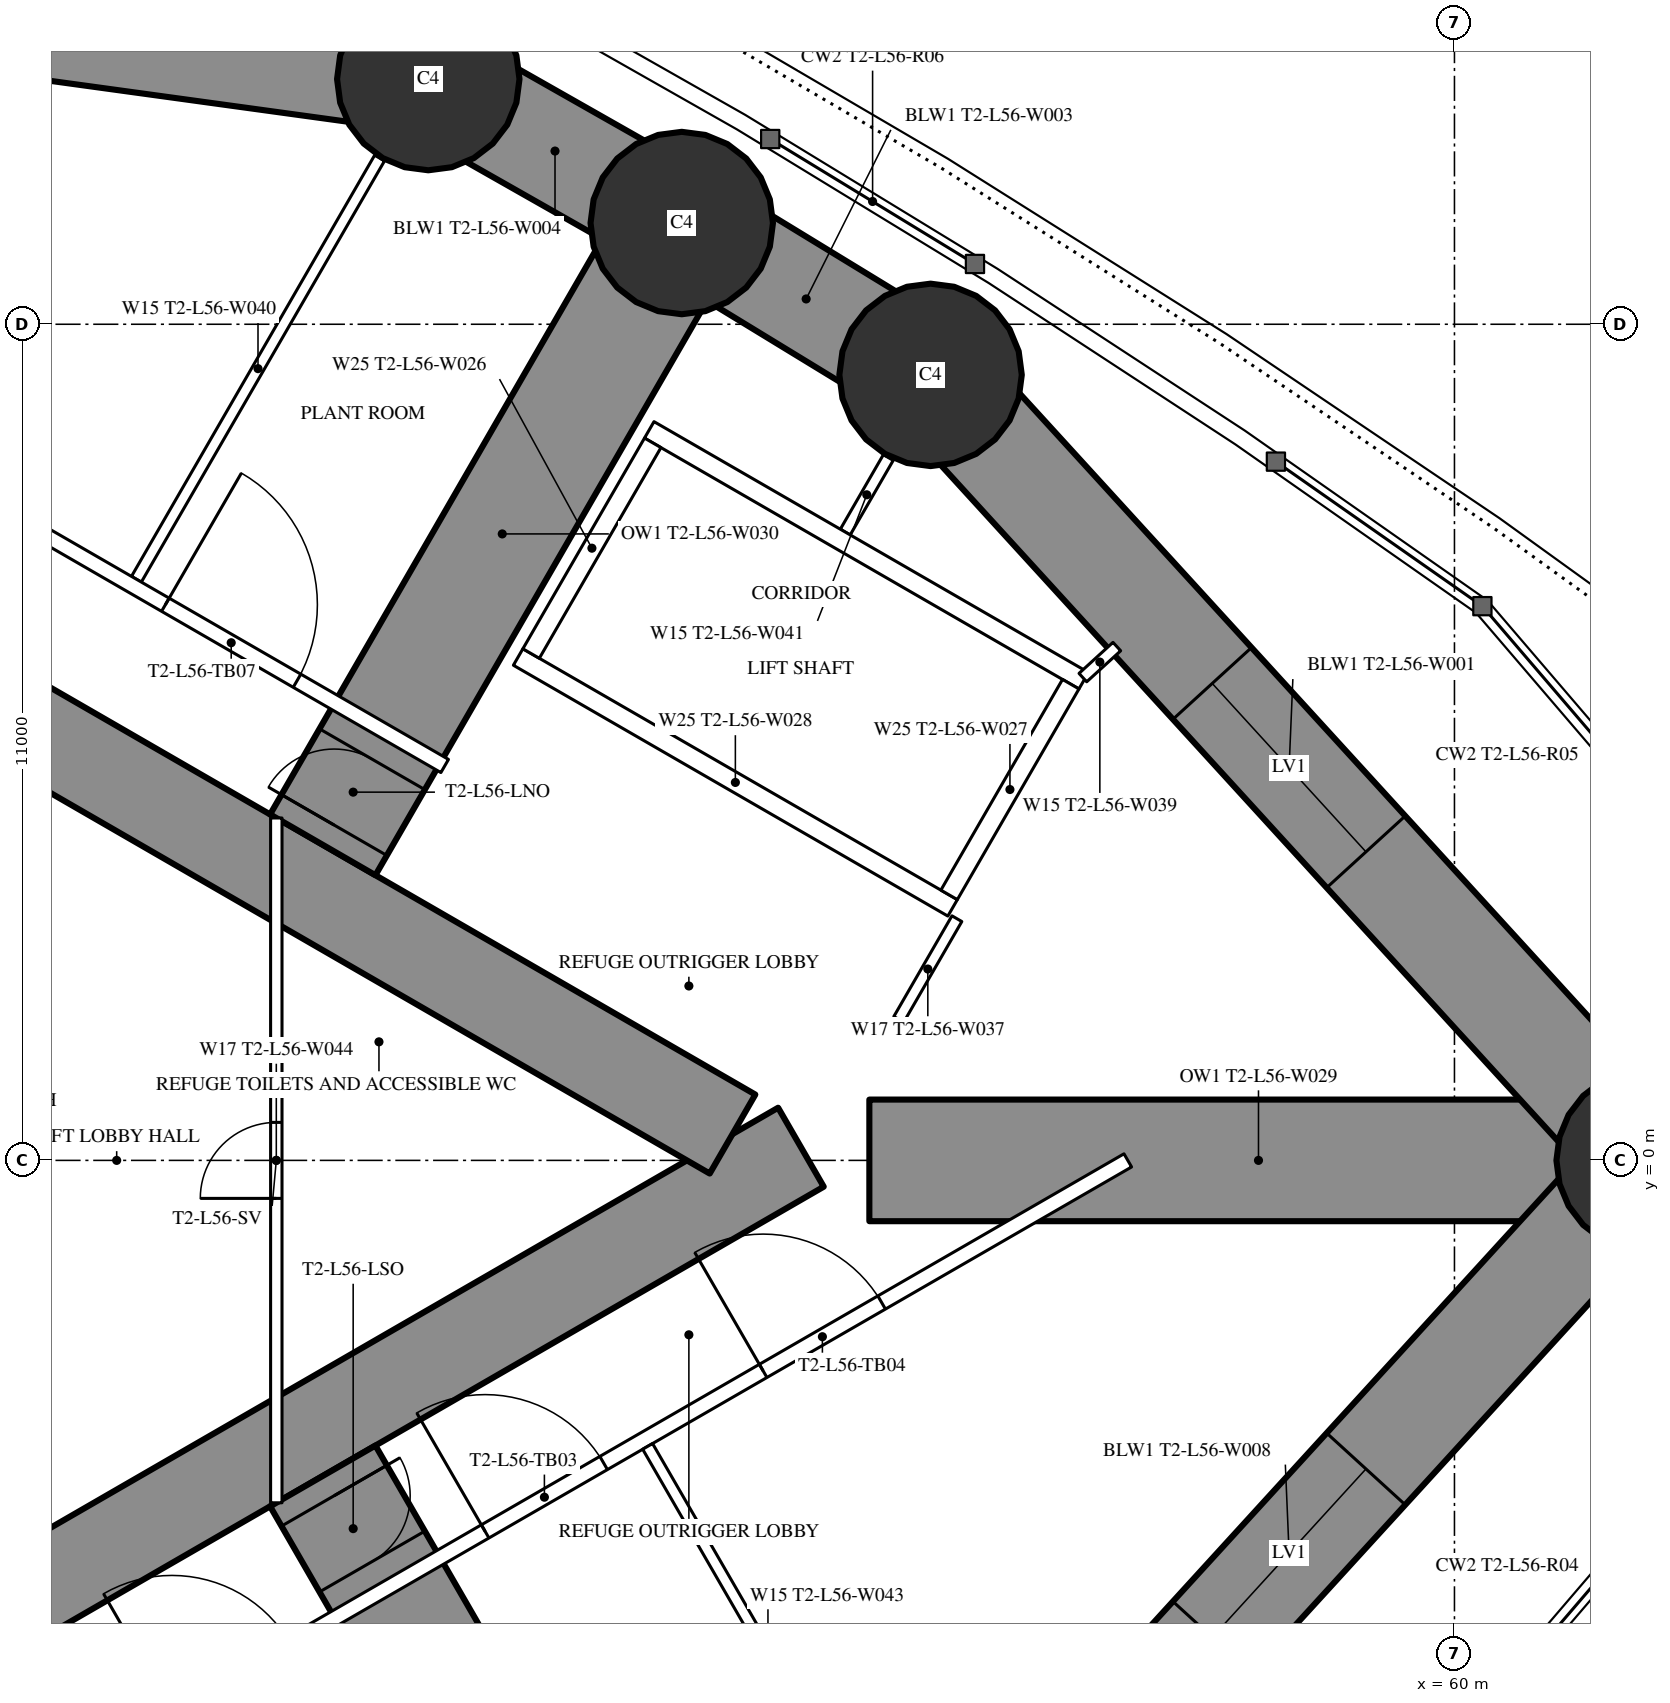
"""IFC4 building model, lengths in metres.
Left out: names, types, materials, properties, quantities, classifications, styles, units other than length and angle.
Written with IfcOpenShell. Run it as: python <this file> out.ifc"""

import sys

from ifc_helpers import new_model, si_unit, direction, frame, frame_2d, origin, origin_2d, place, context, subcontext, project, spatial, rectangle, circle, extrude, element, fill, save


model = new_model("IFC4")
c1 = context("Model", 3, precision=1e-05, world=origin(), true_north=direction((0.0, 1.0)))
c2 = subcontext(c1, "Body", "Model", "MODEL_VIEW")
j1 = project(units=[si_unit("LENGTHUNIT", "METRE"), si_unit("PLANEANGLEUNIT", "RADIAN")], contexts=[c1])
p1 = place(None, origin())
s1 = spatial("IfcSite", under=j1, at=p1, CompositionType="ELEMENT")
p2 = place(p1, origin())
s2 = spatial("IfcBuilding", under=s1, at=p2, CompositionType="ELEMENT")
p3 = place(p2, frame((0.0, 0.0, 210.3)))
s3 = spatial("IfcBuildingStorey", under=s2, at=p3, CompositionType="ELEMENT", Elevation=210.3)
for number, where, z_axis, x_axis in (
    (1, (62.542, 0.0, 0.0), (0.0, 0.0, 1.0), (1.0, 0.0, 0.0)),
    (2, (53.108, 10.334, 0.0), (0.0, 0.0, 1.0), (1.0, 0.0, 0.0)),
    (3, (49.834, 12.332, 0.0), (0.0, 0.0, 1.0), (1.0, 0.0, 0.0)),
    (4, (46.499, 14.226, 0.0), (0.0, 0.0, 1.0), (1.0, 0.0, 0.0)),
):
    element("IfcColumn", number, at=place(p3, frame(where, z_axis=z_axis, x_axis=x_axis)), inside=s3, PredefinedType="COLUMN", context=c2, shape_type="SweptSolid", body=[
        extrude(circle(Radius=1.2, at=origin_2d()), origin(), (0.0, 0.0, 1.0), 5.0),
    ])
p4 = place(p3, frame((27.2, -13.8, 0.0), z_axis=(0.0, 0.0, 1.0), x_axis=(0.866027159892, 0.499996958321, 0.0)))
e5 = element("IfcWall", 5, at=p4, inside=s3, PredefinedType="SHEAR", context=c2, shape_type="SweptSolid", body=[
    extrude(rectangle(XDim=27.947, YDim=1.2, at=frame_2d((13.973, 0.0))), origin(), (0.0, 0.0, 1.0), 5.0),
])
p5 = place(p4, frame((6.5, 0.0, 0.0)))
e6 = element("IfcOpeningElement", 6, at=p5, cuts=e5, PredefinedType="OPENING", context=c2, shape_type="SweptSolid", body=[
    extrude(rectangle(XDim=1.0, YDim=2.2, at=frame_2d((0.5, 1.1))), frame((0.0, 0.61, 0.0), z_axis=(0.0, -1.0, 0.0), x_axis=(1.0, 0.0, 0.0)), (0.0, 0.0, 1.0), 1.22),
])
p6 = place(p4, frame((13.568, 0.0, 0.0)))
e7 = element("IfcOpeningElement", 7, at=p6, cuts=e5, PredefinedType="OPENING", context=c2, shape_type="SweptSolid", body=[
    extrude(rectangle(XDim=1.8, YDim=2.2, at=frame_2d((0.9, 1.1))), frame((0.0, 0.61, 0.0), z_axis=(0.0, -1.0, 0.0), x_axis=(1.0, 0.0, 0.0)), (0.0, 0.0, 1.0), 1.22),
])
p7 = place(p3, frame((27.2, 13.8, 0.0), z_axis=(0.0, 0.0, 1.0), x_axis=(0.866024515034, -0.500001539357, 0.0)))
e8 = element("IfcWall", 8, at=p7, inside=s3, PredefinedType="SHEAR", context=c2, shape_type="SweptSolid", body=[
    extrude(rectangle(XDim=26.907, YDim=1.2, at=frame_2d((13.454, 0.0))), origin(), (0.0, 0.0, 1.0), 5.0),
])
p8 = place(p7, frame((6.5, 0.0, 0.0)))
e9 = element("IfcOpeningElement", 9, at=p8, cuts=e8, PredefinedType="OPENING", context=c2, shape_type="SweptSolid", body=[
    extrude(rectangle(XDim=1.0, YDim=2.2, at=frame_2d((0.5, 1.1))), frame((0.0, 0.61, 0.0), z_axis=(0.0, -1.0, 0.0), x_axis=(1.0, 0.0, 0.0)), (0.0, 0.0, 1.0), 1.22),
])
p9 = place(p7, frame((13.568, 0.0, 0.0)))
e10 = element("IfcOpeningElement", 10, at=p9, cuts=e8, PredefinedType="OPENING", context=c2, shape_type="SweptSolid", body=[
    extrude(rectangle(XDim=1.8, YDim=2.2, at=frame_2d((0.9, 1.1))), frame((0.0, 0.61, 0.0), z_axis=(0.0, -1.0, 0.0), x_axis=(1.0, 0.0, 0.0)), (0.0, 0.0, 1.0), 1.22),
])
p10 = place(p3, frame((45.111, -4.152, 0.0), z_axis=(0.0, 0.0, 1.0), x_axis=(0.499986466662, -0.86603321712, 0.0)))
e11 = element("IfcWall", 11, at=p10, inside=s3, PredefinedType="SHEAR", context=c2, shape_type="SweptSolid", body=[
    extrude(rectangle(XDim=9.446, YDim=1.6, at=frame_2d((4.723, 0.0))), origin(), (0.0, 0.0, 1.0), 5.0),
])
p11 = place(p10, frame((0.3, 0.0, 0.0)))
e12 = element("IfcOpeningElement", 12, at=p11, cuts=e11, PredefinedType="OPENING", context=c2, shape_type="SweptSolid", body=[
    extrude(rectangle(XDim=1.0, YDim=2.2, at=frame_2d((0.5, 1.1))), frame((0.0, 0.81, 0.0), z_axis=(0.0, -1.0, 0.0), x_axis=(1.0, 0.0, 0.0)), (0.0, 0.0, 1.0), 1.62),
])
p12 = place(p3, frame((52.302, 0.0, 0.0), z_axis=(0.0, 0.0, 1.0), x_axis=(1.0, 0.0, 0.0)))
e13 = element("IfcWall", 13, at=p12, inside=s3, PredefinedType="SHEAR", context=c2, shape_type="SweptSolid", body=[
    extrude(rectangle(XDim=10.239, YDim=1.6, at=frame_2d((5.12, 0.0))), origin(), (0.0, 0.0, 1.0), 5.0),
])
p13 = place(p3, frame((45.111, 4.152, 0.0), z_axis=(0.0, 0.0, 1.0), x_axis=(0.499986466662, 0.86603321712, 0.0)))
e14 = element("IfcWall", 14, at=p13, inside=s3, PredefinedType="SHEAR", context=c2, shape_type="SweptSolid", body=[
    extrude(rectangle(XDim=9.446, YDim=1.6, at=frame_2d((4.723, 0.0))), origin(), (0.0, 0.0, 1.0), 5.0),
])
p14 = place(p13, frame((0.3, 0.0, 0.0)))
e15 = element("IfcOpeningElement", 15, at=p14, cuts=e14, PredefinedType="OPENING", context=c2, shape_type="SweptSolid", body=[
    extrude(rectangle(XDim=1.0, YDim=2.2, at=frame_2d((0.5, 1.1))), frame((0.0, 0.81, 0.0), z_axis=(0.0, -1.0, 0.0), x_axis=(1.0, 0.0, 0.0)), (0.0, 0.0, 1.0), 1.62),
])
p15 = place(p3, frame((53.108, -10.334, 0.0), z_axis=(0.0, 0.0, 1.0), x_axis=(0.674209372947, 0.738540263919, 0.0)))
e16 = element("IfcWall", 16, at=p15, inside=s3, PredefinedType="SHEAR", context=c2, shape_type="SweptSolid", body=[
    extrude(rectangle(XDim=13.992, YDim=1.4, at=frame_2d((6.996, 0.0))), origin(), (0.0, 0.0, 1.0), 5.0),
])
p16 = place(p15, frame((5.496, 0.0, 0.6)))
e17 = element("IfcOpeningElement", 17, at=p16, cuts=e16, PredefinedType="OPENING", context=c2, shape_type="SweptSolid", body=[
    extrude(rectangle(XDim=3.0, YDim=1.2, at=frame_2d((1.5, 0.6))), frame((0.0, 0.71, 0.0), z_axis=(0.0, -1.0, 0.0), x_axis=(1.0, 0.0, 0.0)), (0.0, 0.0, 1.0), 1.42),
])
p17 = place(p3, frame((62.542, 0.0, 0.0), z_axis=(0.0, 0.0, 1.0), x_axis=(-0.674209372947, 0.738540263919, 0.0)))
e18 = element("IfcWall", 18, at=p17, inside=s3, PredefinedType="SHEAR", context=c2, shape_type="SweptSolid", body=[
    extrude(rectangle(XDim=13.992, YDim=1.4, at=frame_2d((6.996, 0.0))), origin(), (0.0, 0.0, 1.0), 5.0),
])
p18 = place(p17, frame((5.496, 0.0, 0.6)))
e19 = element("IfcOpeningElement", 19, at=p18, cuts=e18, PredefinedType="OPENING", context=c2, shape_type="SweptSolid", body=[
    extrude(rectangle(XDim=3.0, YDim=1.2, at=frame_2d((1.5, 0.6))), frame((0.0, 0.71, 0.0), z_axis=(0.0, -1.0, 0.0), x_axis=(1.0, 0.0, 0.0)), (0.0, 0.0, 1.0), 1.42),
])
p19 = place(p3, frame((53.108, 10.334, 0.0), z_axis=(0.0, 0.0, 1.0), x_axis=(-0.853604257265, 0.520922040212, 0.0)))
e20 = element("IfcWall", 20, at=p19, inside=s3, PredefinedType="SHEAR", context=c2, shape_type="SweptSolid", body=[
    extrude(rectangle(XDim=3.835, YDim=1.4, at=frame_2d((1.917, 0.0))), origin(), (0.0, 0.0, 1.0), 5.0),
])
p20 = place(p3, frame((49.834, 12.332, 0.0), z_axis=(0.0, 0.0, 1.0), x_axis=(-0.869560321562, 0.493826738001, 0.0)))
e21 = element("IfcWall", 21, at=p20, inside=s3, PredefinedType="SHEAR", context=c2, shape_type="SweptSolid", body=[
    extrude(rectangle(XDim=3.835, YDim=1.4, at=frame_2d((1.917, 0.0))), origin(), (0.0, 0.0, 1.0), 5.0),
])
p21 = place(p3, frame((46.499, 14.226, 0.0), z_axis=(0.0, 0.0, 1.0), x_axis=(-0.990685830783, 0.13616748762, 0.0)))
e22 = element("IfcWall", 22, at=p21, inside=s3, PredefinedType="SHEAR", context=c2, shape_type="SweptSolid", body=[
    extrude(rectangle(XDim=15.313, YDim=1.4, at=frame_2d((7.657, 0.0))), origin(), (0.0, 0.0, 1.0), 5.0),
])
p22 = place(p21, frame((6.157, 0.0, 0.6)))
e23 = element("IfcOpeningElement", 23, at=p22, cuts=e22, PredefinedType="OPENING", context=c2, shape_type="SweptSolid", body=[
    extrude(rectangle(XDim=3.0, YDim=1.2, at=frame_2d((1.5, 0.6))), frame((0.0, 0.71, 0.0), z_axis=(0.0, -1.0, 0.0), x_axis=(1.0, 0.0, 0.0)), (0.0, 0.0, 1.0), 1.42),
])
p23 = place(p3, frame((28.959, -15.44, 0.0), z_axis=(0.0, 0.0, 1.0), x_axis=(0.866025227435, 0.500000305447, 0.0)))
e24 = element("IfcWall", 24, at=p23, inside=s3, PredefinedType="PARTITIONING", context=c2, shape_type="SweptSolid", body=[
    extrude(rectangle(XDim=30.88, YDim=0.2, at=frame_2d((15.44, 0.0))), origin(), (0.0, 0.0, 1.0), 4.75),
])
p24 = place(p23, frame((6.994, 0.0, 0.0)))
e25 = element("IfcOpeningElement", 25, at=p24, cuts=e24, PredefinedType="OPENING", context=c2, shape_type="SweptSolid", body=[
    extrude(rectangle(XDim=2.0, YDim=2.4, at=frame_2d((1.0, 1.2))), frame((0.0, 0.11, 0.0), z_axis=(0.0, -1.0, 0.0), x_axis=(1.0, 0.0, 0.0)), (0.0, 0.0, 1.0), 0.22),
])
p25 = place(p23, frame((16.36, 0.0, 0.0)))
e26 = element("IfcOpeningElement", 26, at=p25, cuts=e24, PredefinedType="OPENING", context=c2, shape_type="SweptSolid", body=[
    extrude(rectangle(XDim=1.8, YDim=2.2, at=frame_2d((0.9, 1.1))), frame((0.0, 0.11, 0.0), z_axis=(0.0, -1.0, 0.0), x_axis=(1.0, 0.0, 0.0)), (0.0, 0.0, 1.0), 0.22),
])
p26 = place(p23, frame((21.118, 0.0, 0.0)))
e27 = element("IfcOpeningElement", 27, at=p26, cuts=e24, PredefinedType="OPENING", context=c2, shape_type="SweptSolid", body=[
    extrude(rectangle(XDim=1.8, YDim=2.2, at=frame_2d((0.9, 1.1))), frame((0.0, 0.11, 0.0), z_axis=(0.0, -1.0, 0.0), x_axis=(1.0, 0.0, 0.0)), (0.0, 0.0, 1.0), 0.22),
])
p27 = place(p23, frame((25.341, 0.0, 0.0)))
e28 = element("IfcOpeningElement", 28, at=p27, cuts=e24, PredefinedType="OPENING", context=c2, shape_type="SweptSolid", body=[
    extrude(rectangle(XDim=1.8, YDim=2.2, at=frame_2d((0.9, 1.1))), frame((0.0, 0.11, 0.0), z_axis=(0.0, -1.0, 0.0), x_axis=(1.0, 0.0, 0.0)), (0.0, 0.0, 1.0), 0.22),
])
p28 = place(p3, frame((49.385, -3.763, 0.0), z_axis=(0.0, 0.0, 1.0), x_axis=(0.499999447814, -0.866025722589, 0.0)))
e29 = element("IfcWall", 29, at=p28, inside=s3, PredefinedType="PARTITIONING", context=c2, shape_type="SweptSolid", body=[
    extrude(rectangle(XDim=6.333, YDim=0.15, at=frame_2d((3.166, 0.0))), origin(), (0.0, 0.0, 1.0), 3.85),
])
p29 = place(p3, frame((42.66, 7.646, 0.0), z_axis=(0.0, 0.0, 1.0), x_axis=(0.499996592859, 0.866027370889, 0.0)))
e30 = element("IfcWall", 30, at=p29, inside=s3, PredefinedType="PARTITIONING", context=c2, shape_type="SweptSolid", body=[
    extrude(rectangle(XDim=6.398, YDim=0.15, at=frame_2d((3.199, 0.0))), origin(), (0.0, 0.0, 1.0), 3.85),
])
p30 = place(p3, frame((51.985, 8.266, 0.0), z_axis=(0.0, 0.0, 1.0), x_axis=(0.50005843372, 0.865991664432, 0.0)))
e31 = element("IfcWall", 31, at=p30, inside=s3, PredefinedType="PARTITIONING", context=c2, shape_type="SweptSolid", body=[
    extrude(rectangle(XDim=1.132, YDim=0.15, at=frame_2d((0.566, 0.0))), origin(), (0.0, 0.0, 1.0), 4.75),
])
p31 = place(p3, frame((28.959, 15.44, 0.0), z_axis=(0.0, 0.0, 1.0), x_axis=(0.866028936079, -0.499993881836, 0.0)))
e32 = element("IfcWall", 32, at=p31, inside=s3, PredefinedType="PARTITIONING", context=c2, shape_type="SweptSolid", body=[
    extrude(rectangle(XDim=20.503, YDim=0.2, at=frame_2d((10.251, 0.0))), origin(), (0.0, 0.0, 1.0), 4.75),
])
p32 = place(p31, frame((16.26, 0.0, 0.0)))
e33 = element("IfcOpeningElement", 33, at=p32, cuts=e32, PredefinedType="OPENING", context=c2, shape_type="SweptSolid", body=[
    extrude(rectangle(XDim=2.0, YDim=2.4, at=frame_2d((1.0, 1.2))), frame((0.0, 0.11, 0.0), z_axis=(0.0, -1.0, 0.0), x_axis=(1.0, 0.0, 0.0)), (0.0, 0.0, 1.0), 0.22),
])
p33 = place(p31, frame((7.094, 0.0, 0.0)))
e34 = element("IfcOpeningElement", 34, at=p33, cuts=e32, PredefinedType="OPENING", context=c2, shape_type="SweptSolid", body=[
    extrude(rectangle(XDim=1.8, YDim=2.2, at=frame_2d((0.9, 1.1))), frame((0.0, 0.11, 0.0), z_axis=(0.0, -1.0, 0.0), x_axis=(1.0, 0.0, 0.0)), (0.0, 0.0, 1.0), 0.22),
])
p34 = place(p3, frame((52.689, 1.855, 0.0), z_axis=(0.0, 0.0, 1.0), x_axis=(0.500035603698, 0.866004847004, 0.0)))
e35 = element("IfcWall", 35, at=p34, inside=s3, PredefinedType="PARTITIONING", context=c2, shape_type="SweptSolid", body=[
    extrude(rectangle(XDim=1.53, YDim=0.15, at=frame_2d((0.765, 0.0))), origin(), (0.0, 0.0, 1.0), 4.75),
])
p35 = place(p3, frame((44.5, -4.505, 0.0), z_axis=(0.0, 0.0, 1.0), x_axis=(0.0, 1.0, 0.0)))
e36 = element("IfcWall", 36, at=p35, inside=s3, PredefinedType="PARTITIONING", context=c2, shape_type="SweptSolid", body=[
    extrude(rectangle(XDim=9.009, YDim=0.15, at=frame_2d((4.505, 0.0))), origin(), (0.0, 0.0, 1.0), 4.75),
])
p36 = place(p35, frame((4.005, 0.0, 0.0)))
e37 = element("IfcOpeningElement", 37, at=p36, cuts=e36, PredefinedType="OPENING", context=c2, shape_type="SweptSolid", body=[
    extrude(rectangle(XDim=1.0, YDim=2.2, at=frame_2d((0.5, 1.1))), frame((0.0, 0.085, 0.0), z_axis=(0.0, -1.0, 0.0), x_axis=(1.0, 0.0, 0.0)), (0.0, 0.0, 1.0), 0.17),
])
for number, where, z_axis, x_axis in (
    (38, (47.681, 6.622, 0.0), (0.0, 0.0, 1.0), (0.866, -0.5, 0.0)),
    (39, (49.406, 9.611, 0.0), (0.0, 0.0, 1.0), (0.866, -0.5, 0.0)),
):
    element("IfcWall", number, at=place(p3, frame(where, z_axis=z_axis, x_axis=x_axis)), inside=s3, PredefinedType="PARTITIONING", context=c2, shape_type="SweptSolid", body=[
        extrude(rectangle(XDim=6.6, YDim=0.25, at=frame_2d((3.3, 0.0))), origin(), (0.0, 0.0, 1.0), 4.75),
    ])
p37 = place(p3, frame((47.852, 6.668, 0.0), z_axis=(0.0, 0.0, 1.0), x_axis=(0.499929347863, 0.866066190972, 0.0)))
e40 = element("IfcWall", 40, at=p37, inside=s3, PredefinedType="PARTITIONING", context=c2, shape_type="SweptSolid", body=[
    extrude(rectangle(XDim=3.201, YDim=0.25, at=frame_2d((1.6, 0.0))), origin(), (0.0, 0.0, 1.0), 4.75),
])
p38 = place(p3, frame((53.352, 3.493, 0.0), z_axis=(0.0, 0.0, 1.0), x_axis=(0.499872130319, 0.866099216793, 0.0)))
e41 = element("IfcWall", 41, at=p38, inside=s3, PredefinedType="PARTITIONING", context=c2, shape_type="SweptSolid", body=[
    extrude(rectangle(XDim=3.2, YDim=0.25, at=frame_2d((1.6, 0.0))), origin(), (0.0, 0.0, 1.0), 4.75),
])
p39 = place(p3, frame((55.111, 6.352, 0.0), z_axis=(0.0, 0.0, 1.0), x_axis=(0.738625136196, 0.674116390677, 0.0)))
e42 = element("IfcWall", 42, at=p39, inside=s3, PredefinedType="PARTITIONING", context=c2, shape_type="SweptSolid", body=[
    extrude(rectangle(XDim=0.605, YDim=0.15, at=frame_2d((0.303, 0.0))), origin(), (0.0, 0.0, 1.0), 4.75),
])
p40 = place(p16, origin())
e43 = element("IfcWindow", 43, at=p40, inside=s3, PartitioningType="SINGLE_PANEL", PredefinedType="WINDOW", context=c2, shape_type="SweptSolid", body=[
    extrude(rectangle(XDim=3.0, YDim=1.2, at=frame_2d((1.5, 0.6))), frame((0.0, 0.03, 0.0), z_axis=(0.0, -1.0, 0.0), x_axis=(1.0, 0.0, 0.0)), (0.0, 0.0, 1.0), 0.06),
])
fill(e17, e43)
p41 = place(p18, origin())
e44 = element("IfcWindow", 44, at=p41, inside=s3, PartitioningType="SINGLE_PANEL", PredefinedType="WINDOW", context=c2, shape_type="SweptSolid", body=[
    extrude(rectangle(XDim=3.0, YDim=1.2, at=frame_2d((1.5, 0.6))), frame((0.0, 0.03, 0.0), z_axis=(0.0, -1.0, 0.0), x_axis=(1.0, 0.0, 0.0)), (0.0, 0.0, 1.0), 0.06),
])
fill(e19, e44)
p42 = place(p11, origin())
e45 = element("IfcDoor", 45, at=p42, inside=s3, OperationType="SINGLE_SWING_LEFT", PredefinedType="DOOR", context=c2, shape_type="SweptSolid", body=[
    extrude(rectangle(XDim=1.0, YDim=2.2, at=frame_2d((0.5, 1.1))), frame((0.0, 0.025, 0.0), z_axis=(0.0, -1.0, 0.0), x_axis=(1.0, 0.0, 0.0)), (0.0, 0.0, 1.0), 0.05),
])
fill(e12, e45)
p43 = place(p14, origin())
e46 = element("IfcDoor", 46, at=p43, inside=s3, OperationType="SINGLE_SWING_LEFT", PredefinedType="DOOR", context=c2, shape_type="SweptSolid", body=[
    extrude(rectangle(XDim=1.0, YDim=2.2, at=frame_2d((0.5, 1.1))), frame((0.0, 0.025, 0.0), z_axis=(0.0, -1.0, 0.0), x_axis=(1.0, 0.0, 0.0)), (0.0, 0.0, 1.0), 0.05),
])
fill(e15, e46)
p44 = place(p26, origin())
e47 = element("IfcDoor", 47, at=p44, inside=s3, OperationType="DOUBLE_DOOR_SINGLE_SWING", PredefinedType="DOOR", context=c2, shape_type="SweptSolid", body=[
    extrude(rectangle(XDim=1.8, YDim=2.2, at=frame_2d((0.9, 1.1))), frame((0.0, 0.025, 0.0), z_axis=(0.0, -1.0, 0.0), x_axis=(1.0, 0.0, 0.0)), (0.0, 0.0, 1.0), 0.05),
])
fill(e27, e47)
p45 = place(p27, origin())
e48 = element("IfcDoor", 48, at=p45, inside=s3, OperationType="DOUBLE_DOOR_SINGLE_SWING", PredefinedType="DOOR", context=c2, shape_type="SweptSolid", body=[
    extrude(rectangle(XDim=1.8, YDim=2.2, at=frame_2d((0.9, 1.1))), frame((0.0, 0.025, 0.0), z_axis=(0.0, -1.0, 0.0), x_axis=(1.0, 0.0, 0.0)), (0.0, 0.0, 1.0), 0.05),
])
fill(e28, e48)
p46 = place(p32, origin())
e49 = element("IfcDoor", 49, at=p46, inside=s3, OperationType="DOUBLE_DOOR_SINGLE_SWING", PredefinedType="DOOR", context=c2, shape_type="SweptSolid", body=[
    extrude(rectangle(XDim=2.0, YDim=2.4, at=frame_2d((1.0, 1.2))), frame((0.0, 0.025, 0.0), z_axis=(0.0, -1.0, 0.0), x_axis=(1.0, 0.0, 0.0)), (0.0, 0.0, 1.0), 0.05),
])
fill(e33, e49)
p47 = place(p36, origin())
e50 = element("IfcDoor", 50, at=p47, inside=s3, OperationType="SINGLE_SWING_LEFT", PredefinedType="DOOR", context=c2, shape_type="SweptSolid", body=[
    extrude(rectangle(XDim=1.0, YDim=2.2, at=frame_2d((0.5, 1.1))), frame((0.0, 0.025, 0.0), z_axis=(0.0, -1.0, 0.0), x_axis=(1.0, 0.0, 0.0)), (0.0, 0.0, 1.0), 0.05),
])
fill(e37, e50)
save(model, sys.argv[1])
